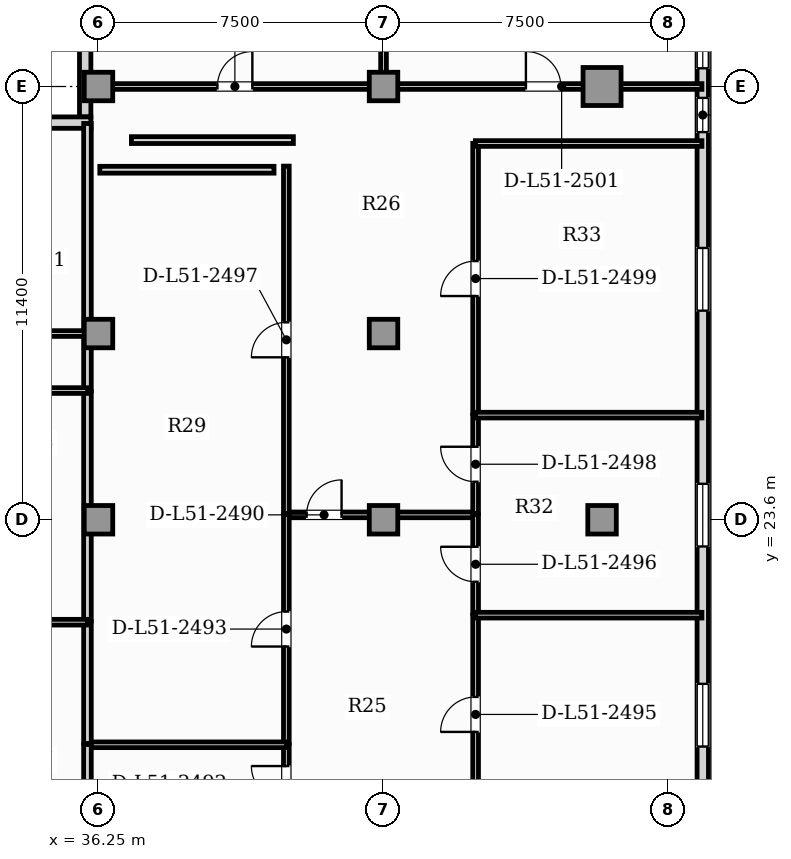
"""IFC4 building model, lengths in metres.
Left out: names, types, materials, properties, quantities, classifications, styles, units other than length and angle.
Written with IfcOpenShell. Run it as: python <this file> out.ifc"""

import sys

from ifc_helpers import new_model, si_unit, direction, frame, frame_2d, origin, origin_2d, place, context, subcontext, project, spatial, rectangle, hollow_rectangle, extrude, element, fill, save


model = new_model("IFC4")
c1 = context("Model", 3, precision=1e-05, world=origin(), true_north=direction((0.0, 1.0)))
c2 = subcontext(c1, "Body", "Model", "MODEL_VIEW")
j1 = project(units=[si_unit("LENGTHUNIT", "METRE"), si_unit("PLANEANGLEUNIT", "RADIAN")], contexts=[c1])
p1 = place(None, origin())
s1 = spatial("IfcSite", under=j1, at=p1, CompositionType="ELEMENT")
p2 = place(p1, origin())
s2 = spatial("IfcBuilding", under=s1, at=p2, CompositionType="ELEMENT")
p3 = place(p2, frame((0.0, 0.0, 208.0)))
s3 = spatial("IfcBuildingStorey", under=s2, at=p3, CompositionType="ELEMENT", Elevation=208.0)
p4 = place(p3, frame((49.5, 35.0, 0.0), z_axis=(0.0, 0.0, 1.0), x_axis=(1.0, 0.0, 0.0)))
e1 = element("IfcColumn", 1, at=p4, inside=s3, PredefinedType="USERDEFINED", context=c2, shape_type="SweptSolid", body=[
    extrude(hollow_rectangle(XDim=1.0, YDim=1.0, WallThickness=0.06, at=origin_2d()), origin(), (0.0, 0.0, 1.0), 3.85),
])
for number, where, z_axis, x_axis in (
    (2, (36.25, 23.6, 0.0), (0.0, 0.0, 1.0), (1.0, 0.0, 0.0)),
    (3, (43.75, 23.6, 0.0), (0.0, 0.0, 1.0), (1.0, 0.0, 0.0)),
    (4, (49.5, 23.6, 0.0), (0.0, 0.0, 1.0), (1.0, 0.0, 0.0)),
    (5, (36.25, 28.5, 0.0), (0.0, 0.0, 1.0), (1.0, 0.0, 0.0)),
    (6, (43.75, 28.5, 0.0), (0.0, 0.0, 1.0), (1.0, 0.0, 0.0)),
    (7, (36.25, 35.0, 0.0), (0.0, 0.0, 1.0), (1.0, 0.0, 0.0)),
    (8, (43.75, 35.0, 0.0), (0.0, 0.0, 1.0), (1.0, 0.0, 0.0)),
):
    element("IfcColumn", number, at=place(p3, frame(where, z_axis=z_axis, x_axis=x_axis)), inside=s3, PredefinedType="COLUMN", context=c2, shape_type="SweptSolid", body=[
        extrude(rectangle(XDim=0.75, YDim=0.75, at=origin_2d()), origin(), (0.0, 0.0, 1.0), 3.85),
    ])
p5 = place(p3, frame((52.15, 3.24, 0.0), z_axis=(0.0, 0.0, 1.0), x_axis=(0.0, 1.0, 0.0)))
e9 = element("IfcWall", 9, at=p5, inside=s3, PredefinedType="SOLIDWALL", context=c2, shape_type="SweptSolid", body=[
    extrude(rectangle(XDim=33.92, YDim=0.3, at=frame_2d((16.96, 0.0))), origin(), (0.0, 0.0, 1.0), 3.63),
])
p6 = place(p5, frame((30.56, 0.0, 0.95)))
e10 = element("IfcOpeningElement", 10, at=p6, cuts=e9, PredefinedType="OPENING", context=c2, shape_type="SweptSolid", body=[
    extrude(rectangle(XDim=0.9, YDim=1.5, at=frame_2d((0.45, 0.75))), frame((0.0, 0.16, 0.0), z_axis=(0.0, -1.0, 0.0), x_axis=(1.0, 0.0, 0.0)), (0.0, 0.0, 1.0), 0.32),
])
p7 = place(p5, frame((11.108, 0.0, 0.95)))
e11 = element("IfcOpeningElement", 11, at=p7, cuts=e9, PredefinedType="OPENING", context=c2, shape_type="SweptSolid", body=[
    extrude(rectangle(XDim=0.9, YDim=1.5, at=frame_2d((0.45, 0.75))), frame((0.0, 0.16, 0.0), z_axis=(0.0, -1.0, 0.0), x_axis=(1.0, 0.0, 0.0)), (0.0, 0.0, 1.0), 0.32),
])
p8 = place(p5, frame((14.393, 0.0, 0.88)))
e12 = element("IfcOpeningElement", 12, at=p8, cuts=e9, PredefinedType="OPENING", context=c2, shape_type="SweptSolid", body=[
    extrude(rectangle(XDim=1.65, YDim=2.0, at=frame_2d((0.825, 1.0))), frame((0.0, 0.16, 0.0), z_axis=(0.0, -1.0, 0.0), x_axis=(1.0, 0.0, 0.0)), (0.0, 0.0, 1.0), 0.32),
])
p9 = place(p5, frame((19.657, 0.0, 0.88)))
e13 = element("IfcOpeningElement", 13, at=p9, cuts=e9, PredefinedType="OPENING", context=c2, shape_type="SweptSolid", body=[
    extrude(rectangle(XDim=1.65, YDim=2.0, at=frame_2d((0.825, 1.0))), frame((0.0, 0.16, 0.0), z_axis=(0.0, -1.0, 0.0), x_axis=(1.0, 0.0, 0.0)), (0.0, 0.0, 1.0), 0.32),
])
p10 = place(p5, frame((25.862, 0.0, 0.88)))
e14 = element("IfcOpeningElement", 14, at=p10, cuts=e9, PredefinedType="OPENING", context=c2, shape_type="SweptSolid", body=[
    extrude(rectangle(XDim=1.65, YDim=2.0, at=frame_2d((0.825, 1.0))), frame((0.0, 0.16, 0.0), z_axis=(0.0, -1.0, 0.0), x_axis=(1.0, 0.0, 0.0)), (0.0, 0.0, 1.0), 0.32),
])
p11 = place(p5, frame((32.24, 0.0, 0.95)))
e15 = element("IfcOpeningElement", 15, at=p11, cuts=e9, PredefinedType="OPENING", context=c2, shape_type="SweptSolid", body=[
    extrude(rectangle(XDim=0.9, YDim=1.5, at=frame_2d((0.45, 0.75))), frame((0.0, 0.16, 0.0), z_axis=(0.0, -1.0, 0.0), x_axis=(1.0, 0.0, 0.0)), (0.0, 0.0, 1.0), 0.32),
])
p12 = place(p3, frame((35.9, 40.36, 0.0), z_axis=(0.0, 0.0, 1.0), x_axis=(0.0, -1.0, 0.0)))
e16 = element("IfcWall", 16, at=p12, inside=s3, PredefinedType="SOLIDWALL", context=c2, shape_type="SweptSolid", body=[
    extrude(rectangle(XDim=6.16, YDim=0.3, at=frame_2d((3.08, 0.0))), origin(), (0.0, 0.0, 1.0), 3.63),
])
p13 = place(p3, frame((34.25, 34.05, 0.0), z_axis=(0.0, 0.0, 1.0), x_axis=(1.0, 0.0, 0.0)))
e17 = element("IfcWall", 17, at=p13, inside=s3, PredefinedType="SOLIDWALL", context=c2, shape_type="SweptSolid", body=[
    extrude(rectangle(XDim=1.8, YDim=0.3, at=frame_2d((0.9, 0.0))), origin(), (0.0, 0.0, 1.0), 3.63),
])
p14 = place(p3, frame((41.188, 23.729, 0.0), z_axis=(0.0, 0.0, 1.0), x_axis=(1.0, 0.0, 0.0)))
e18 = element("IfcWall", 18, at=p14, inside=s3, PredefinedType="PARTITIONING", context=c2, shape_type="SweptSolid", body=[
    extrude(rectangle(XDim=4.99, YDim=0.15, at=frame_2d((2.495, 0.0))), origin(), (0.0, 0.0, 1.0), 3.085),
])
p15 = place(p14, frame((0.538, 0.0, 0.0)))
e19 = element("IfcOpeningElement", 19, at=p15, cuts=e18, PredefinedType="OPENING", context=c2, shape_type="SweptSolid", body=[
    extrude(rectangle(XDim=0.92, YDim=2.1, at=frame_2d((0.46, 1.05))), frame((0.0, 0.085, 0.0), z_axis=(0.0, -1.0, 0.0), x_axis=(1.0, 0.0, 0.0)), (0.0, 0.0, 1.0), 0.17),
])
p16 = place(p3, frame((41.193, 15.635, 0.0), z_axis=(0.0, 0.0, 1.0), x_axis=(0.0, 1.0, 0.0)))
e20 = element("IfcWall", 20, at=p16, inside=s3, PredefinedType="PARTITIONING", context=c2, shape_type="SweptSolid", body=[
    extrude(rectangle(XDim=2.05, YDim=0.15, at=frame_2d((1.025, 0.0))), origin(), (0.0, 0.0, 1.0), 3.63),
])
p17 = place(p16, frame((0.565, 0.0, 0.0)))
e21 = element("IfcOpeningElement", 21, at=p17, cuts=e20, PredefinedType="OPENING", context=c2, shape_type="SweptSolid", body=[
    extrude(rectangle(XDim=0.92, YDim=2.1, at=frame_2d((0.46, 1.05))), frame((0.0, 0.085, 0.0), z_axis=(0.0, -1.0, 0.0), x_axis=(1.0, 0.0, 0.0)), (0.0, 0.0, 1.0), 0.17),
])
p18 = place(p3, frame((41.193, 17.715, 0.0), z_axis=(0.0, 0.0, 1.0), x_axis=(0.0, 1.0, 0.0)))
e22 = element("IfcWall", 22, at=p18, inside=s3, PredefinedType="PARTITIONING", context=c2, shape_type="SweptSolid", body=[
    extrude(rectangle(XDim=6.019, YDim=0.15, at=frame_2d((3.01, 0.0))), origin(), (0.0, 0.0, 1.0), 3.63),
])
p19 = place(p18, frame((2.55, 0.0, 0.0)))
e23 = element("IfcOpeningElement", 23, at=p19, cuts=e22, PredefinedType="OPENING", context=c2, shape_type="SweptSolid", body=[
    extrude(rectangle(XDim=0.92, YDim=2.1, at=frame_2d((0.46, 1.05))), frame((0.0, 0.085, 0.0), z_axis=(0.0, -1.0, 0.0), x_axis=(1.0, 0.0, 0.0)), (0.0, 0.0, 1.0), 0.17),
])
p20 = place(p3, frame((46.173, 15.861, 0.0), z_axis=(0.0, 0.0, 1.0), x_axis=(0.0, 1.0, 0.0)))
e24 = element("IfcWall", 24, at=p20, inside=s3, PredefinedType="PARTITIONING", context=c2, shape_type="SweptSolid", body=[
    extrude(rectangle(XDim=5.234, YDim=0.15, at=frame_2d((2.617, 0.0))), origin(), (0.0, 0.0, 1.0), 3.63),
])
p21 = place(p20, frame((2.157, 0.0, 0.0)))
e25 = element("IfcOpeningElement", 25, at=p21, cuts=e24, PredefinedType="OPENING", context=c2, shape_type="SweptSolid", body=[
    extrude(rectangle(XDim=0.92, YDim=2.1, at=frame_2d((0.46, 1.05))), frame((0.0, 0.085, 0.0), z_axis=(0.0, -1.0, 0.0), x_axis=(1.0, 0.0, 0.0)), (0.0, 0.0, 1.0), 0.17),
])
p22 = place(p3, frame((46.173, 21.125, 0.0), z_axis=(0.0, 0.0, 1.0), x_axis=(0.0, 1.0, 0.0)))
e26 = element("IfcWall", 26, at=p22, inside=s3, PredefinedType="PARTITIONING", context=c2, shape_type="SweptSolid", body=[
    extrude(rectangle(XDim=2.609, YDim=0.15, at=frame_2d((1.305, 0.0))), origin(), (0.0, 0.0, 1.0), 3.63),
])
p23 = place(p22, frame((0.845, 0.0, 0.0)))
e27 = element("IfcOpeningElement", 27, at=p23, cuts=e26, PredefinedType="OPENING", context=c2, shape_type="SweptSolid", body=[
    extrude(rectangle(XDim=0.92, YDim=2.1, at=frame_2d((0.46, 1.05))), frame((0.0, 0.085, 0.0), z_axis=(0.0, -1.0, 0.0), x_axis=(1.0, 0.0, 0.0)), (0.0, 0.0, 1.0), 0.17),
])
p24 = place(p3, frame((41.193, 23.764, 0.0), z_axis=(0.0, 0.0, 1.0), x_axis=(0.0, 1.0, 0.0)))
e28 = element("IfcWall", 28, at=p24, inside=s3, PredefinedType="PARTITIONING", context=c2, shape_type="SweptSolid", body=[
    extrude(rectangle(XDim=9.141, YDim=0.15, at=frame_2d((4.57, 0.0))), origin(), (0.0, 0.0, 1.0), 3.63),
])
p25 = place(p24, frame((4.111, 0.0, 0.0)))
e29 = element("IfcOpeningElement", 29, at=p25, cuts=e28, PredefinedType="OPENING", context=c2, shape_type="SweptSolid", body=[
    extrude(rectangle(XDim=0.92, YDim=2.1, at=frame_2d((0.46, 1.05))), frame((0.0, 0.085, 0.0), z_axis=(0.0, -1.0, 0.0), x_axis=(1.0, 0.0, 0.0)), (0.0, 0.0, 1.0), 0.17),
])
p26 = place(p3, frame((46.173, 23.764, 0.0), z_axis=(0.0, 0.0, 1.0), x_axis=(0.0, 1.0, 0.0)))
e30 = element("IfcWall", 30, at=p26, inside=s3, PredefinedType="PARTITIONING", context=c2, shape_type="SweptSolid", body=[
    extrude(rectangle(XDim=2.594, YDim=0.15, at=frame_2d((1.297, 0.0))), origin(), (0.0, 0.0, 1.0), 3.63),
])
p27 = place(p26, frame((0.837, 0.0, 0.0)))
e31 = element("IfcOpeningElement", 31, at=p27, cuts=e30, PredefinedType="OPENING", context=c2, shape_type="SweptSolid", body=[
    extrude(rectangle(XDim=0.92, YDim=2.1, at=frame_2d((0.46, 1.05))), frame((0.0, 0.085, 0.0), z_axis=(0.0, -1.0, 0.0), x_axis=(1.0, 0.0, 0.0)), (0.0, 0.0, 1.0), 0.17),
])
p28 = place(p3, frame((46.173, 26.388, 0.0), z_axis=(0.0, 0.0, 1.0), x_axis=(0.0, 1.0, 0.0)))
e32 = element("IfcWall", 32, at=p28, inside=s3, PredefinedType="PARTITIONING", context=c2, shape_type="SweptSolid", body=[
    extrude(rectangle(XDim=7.116, YDim=0.15, at=frame_2d((3.558, 0.0))), origin(), (0.0, 0.0, 1.0), 3.63),
])
p29 = place(p28, frame((3.098, 0.0, 0.0)))
e33 = element("IfcOpeningElement", 33, at=p29, cuts=e32, PredefinedType="OPENING", context=c2, shape_type="SweptSolid", body=[
    extrude(rectangle(XDim=0.92, YDim=2.1, at=frame_2d((0.46, 1.05))), frame((0.0, 0.085, 0.0), z_axis=(0.0, -1.0, 0.0), x_axis=(1.0, 0.0, 0.0)), (0.0, 0.0, 1.0), 0.17),
])
p30 = place(p3, frame((46.168, 33.5, 0.0), z_axis=(0.0, 0.0, 1.0), x_axis=(1.0, 0.0, 0.0)))
e34 = element("IfcWall", 34, at=p30, inside=s3, PredefinedType="PARTITIONING", context=c2, shape_type="SweptSolid", body=[
    extrude(rectangle(XDim=5.959, YDim=0.15, at=frame_2d((2.979, 0.0))), origin(), (0.0, 0.0, 1.0), 3.63),
])
p31 = place(p3, frame((35.923, 35.0, 0.0), z_axis=(0.0, 0.0, 1.0), x_axis=(1.0, 0.0, 0.0)))
e35 = element("IfcWall", 35, at=p31, inside=s3, PredefinedType="PARTITIONING", context=c2, shape_type="SweptSolid", body=[
    extrude(rectangle(XDim=7.832, YDim=0.15, at=frame_2d((3.916, 0.0))), origin(), (0.0, 0.0, 1.0), 3.085),
])
p32 = place(p31, frame((3.456, 0.0, 0.0)))
e36 = element("IfcOpeningElement", 36, at=p32, cuts=e35, PredefinedType="OPENING", context=c2, shape_type="SweptSolid", body=[
    extrude(rectangle(XDim=0.92, YDim=2.1, at=frame_2d((0.46, 1.05))), frame((0.0, 0.085, 0.0), z_axis=(0.0, -1.0, 0.0), x_axis=(1.0, 0.0, 0.0)), (0.0, 0.0, 1.0), 0.17),
])
p33 = place(p3, frame((43.785, 35.0, 0.0), z_axis=(0.0, 0.0, 1.0), x_axis=(1.0, 0.0, 0.0)))
e37 = element("IfcWall", 37, at=p33, inside=s3, PredefinedType="PARTITIONING", context=c2, shape_type="SweptSolid", body=[
    extrude(rectangle(XDim=8.343, YDim=0.15, at=frame_2d((4.171, 0.0))), origin(), (0.0, 0.0, 1.0), 3.085),
])
p34 = place(p33, frame((3.711, 0.0, 0.0)))
e38 = element("IfcOpeningElement", 38, at=p34, cuts=e37, PredefinedType="OPENING", context=c2, shape_type="SweptSolid", body=[
    extrude(rectangle(XDim=0.92, YDim=2.1, at=frame_2d((0.46, 1.05))), frame((0.0, 0.085, 0.0), z_axis=(0.0, -1.0, 0.0), x_axis=(1.0, 0.0, 0.0)), (0.0, 0.0, 1.0), 0.17),
])
p35 = place(p3, frame((35.955, 17.68, 0.0), z_axis=(0.0, 0.0, 1.0), x_axis=(1.0, 0.0, 0.0)))
e39 = element("IfcWall", 39, at=p35, inside=s3, PredefinedType="PARTITIONING", context=c2, shape_type="SweptSolid", body=[
    extrude(rectangle(XDim=5.243, YDim=0.15, at=frame_2d((2.622, 0.0))), origin(), (0.0, 0.0, 1.0), 3.63),
])
p36 = place(p3, frame((35.96, 16.087, 0.0), z_axis=(0.0, 0.0, 1.0), x_axis=(0.0, 1.0, 0.0)))
e40 = element("IfcWall", 40, at=p36, inside=s3, PredefinedType="PARTITIONING", context=c2, shape_type="SweptSolid", body=[
    extrude(rectangle(XDim=1.597, YDim=0.2, at=frame_2d((0.799, 0.0))), origin(), (0.0, 0.0, 1.0), 3.63),
])
p37 = place(p3, frame((35.96, 26.995, 0.0), z_axis=(0.0, 0.0, 1.0), x_axis=(0.0, 1.0, 0.0)))
e41 = element("IfcWall", 41, at=p37, inside=s3, PredefinedType="PARTITIONING", context=c2, shape_type="SweptSolid", body=[
    extrude(rectangle(XDim=1.51, YDim=0.2, at=frame_2d((0.755, 0.0))), origin(), (0.0, 0.0, 1.0), 3.63),
])
p38 = place(p3, frame((35.96, 17.715, 0.0), z_axis=(0.0, 0.0, 1.0), x_axis=(0.0, 1.0, 0.0)))
e42 = element("IfcWall", 42, at=p38, inside=s3, PredefinedType="PARTITIONING", context=c2, shape_type="SweptSolid", body=[
    extrude(rectangle(XDim=3.195, YDim=0.2, at=frame_2d((1.598, 0.0))), origin(), (0.0, 0.0, 1.0), 3.63),
])
p39 = place(p3, frame((35.96, 20.94, 0.0), z_axis=(0.0, 0.0, 1.0), x_axis=(0.0, 1.0, 0.0)))
e43 = element("IfcWall", 43, at=p39, inside=s3, PredefinedType="PARTITIONING", context=c2, shape_type="SweptSolid", body=[
    extrude(rectangle(XDim=6.025, YDim=0.2, at=frame_2d((3.013, 0.0))), origin(), (0.0, 0.0, 1.0), 3.63),
])
p40 = place(p3, frame((35.96, 28.535, 0.0), z_axis=(0.0, 0.0, 1.0), x_axis=(0.0, 1.0, 0.0)))
e44 = element("IfcWall", 44, at=p40, inside=s3, PredefinedType="PARTITIONING", context=c2, shape_type="SweptSolid", body=[
    extrude(rectangle(XDim=5.493, YDim=0.2, at=frame_2d((2.746, 0.0))), origin(), (0.0, 0.0, 1.0), 3.63),
])
for number, where, z_axis, x_axis in (
    (45, (46.168, 21.09, 0.0), (0.0, 0.0, 1.0), (1.0, 0.0, 0.0)),
    (46, (46.168, 26.354, 0.0), (0.0, 0.0, 1.0), (1.0, 0.0, 0.0)),
):
    element("IfcWall", number, at=place(p3, frame(where, z_axis=z_axis, x_axis=x_axis)), inside=s3, PredefinedType="PARTITIONING", context=c2, shape_type="SweptSolid", body=[
        extrude(rectangle(XDim=5.959, YDim=0.15, at=frame_2d((2.979, 0.0))), origin(), (0.0, 0.0, 1.0), 3.63),
    ])
p41 = place(p3, frame((43.75, 34.995, 0.0), z_axis=(0.0, 0.0, 1.0), x_axis=(0.0, 1.0, 0.0)))
e47 = element("IfcWall", 47, at=p41, inside=s3, PredefinedType="PARTITIONING", context=c2, shape_type="SweptSolid", body=[
    extrude(rectangle(XDim=5.232, YDim=0.15, at=frame_2d((2.616, 0.0))), origin(), (0.0, 0.0, 1.0), 3.63),
])
p42 = place(p3, frame((31.294, 27.0, 0.0), z_axis=(0.0, 0.0, 1.0), x_axis=(1.0, 0.0, 0.0)))
e48 = element("IfcWall", 48, at=p42, inside=s3, PredefinedType="PARTITIONING", context=c2, shape_type="SweptSolid", body=[
    extrude(rectangle(XDim=4.671, YDim=0.15, at=frame_2d((2.335, 0.0))), origin(), (0.0, 0.0, 1.0), 3.63),
])
p43 = place(p3, frame((31.767, 28.5, 0.0), z_axis=(0.0, 0.0, 1.0), x_axis=(1.0, 0.0, 0.0)))
e49 = element("IfcWall", 49, at=p43, inside=s3, PredefinedType="PARTITIONING", context=c2, shape_type="SweptSolid", body=[
    extrude(rectangle(XDim=4.198, YDim=0.15, at=frame_2d((2.099, 0.0))), origin(), (0.0, 0.0, 1.0), 3.63),
])
p44 = place(p43, frame((1.639, 0.0, 0.0)))
e50 = element("IfcOpeningElement", 50, at=p44, cuts=e49, PredefinedType="OPENING", context=c2, shape_type="SweptSolid", body=[
    extrude(rectangle(XDim=0.92, YDim=2.1, at=frame_2d((0.46, 1.05))), frame((0.0, 0.085, 0.0), z_axis=(0.0, -1.0, 0.0), x_axis=(1.0, 0.0, 0.0)), (0.0, 0.0, 1.0), 0.17),
])
p45 = place(p3, frame((31.294, 20.905, 0.0), z_axis=(0.0, 0.0, 1.0), x_axis=(1.0, 0.0, 0.0)))
e51 = element("IfcWall", 51, at=p45, inside=s3, PredefinedType="PARTITIONING", context=c2, shape_type="SweptSolid", body=[
    extrude(rectangle(XDim=4.671, YDim=0.15, at=frame_2d((2.335, 0.0))), origin(), (0.0, 0.0, 1.0), 3.63),
])
p46 = place(p3, frame((41.378, 33.59, 0.0), z_axis=(0.0, 0.0, 1.0), x_axis=(-1.0, 0.0, 0.0)))
e52 = element("IfcWall", 52, at=p46, inside=s3, PredefinedType="PARTITIONING", context=c2, shape_type="SweptSolid", body=[
    extrude(rectangle(XDim=4.262, YDim=0.18, at=frame_2d((2.131, 0.0))), origin(), (0.0, 0.0, 1.0), 3.63),
])
p47 = place(p3, frame((36.285, 32.81, 0.0), z_axis=(0.0, 0.0, 1.0), x_axis=(1.0, 0.0, 0.0)))
e53 = element("IfcWall", 53, at=p47, inside=s3, PredefinedType="PARTITIONING", context=c2, shape_type="SweptSolid", body=[
    extrude(rectangle(XDim=4.583, YDim=0.18, at=frame_2d((2.292, 0.0))), origin(), (0.0, 0.0, 1.0), 3.63),
])
p48 = place(p6, origin())
e54 = element("IfcWindow", 54, at=p48, inside=s3, PartitioningType="SINGLE_PANEL", PredefinedType="WINDOW", context=c2, shape_type="SweptSolid", body=[
    extrude(rectangle(XDim=0.9, YDim=1.5, at=frame_2d((0.45, 0.75))), frame((0.0, 0.03, 0.0), z_axis=(0.0, -1.0, 0.0), x_axis=(1.0, 0.0, 0.0)), (0.0, 0.0, 1.0), 0.06),
])
fill(e10, e54)
p49 = place(p8, origin())
e55 = element("IfcWindow", 55, at=p49, inside=s3, PartitioningType="SINGLE_PANEL", PredefinedType="WINDOW", context=c2, shape_type="SweptSolid", body=[
    extrude(rectangle(XDim=1.65, YDim=2.0, at=frame_2d((0.825, 1.0))), frame((0.0, 0.03, 0.0), z_axis=(0.0, -1.0, 0.0), x_axis=(1.0, 0.0, 0.0)), (0.0, 0.0, 1.0), 0.06),
])
fill(e12, e55)
p50 = place(p9, origin())
e56 = element("IfcWindow", 56, at=p50, inside=s3, PartitioningType="SINGLE_PANEL", PredefinedType="WINDOW", context=c2, shape_type="SweptSolid", body=[
    extrude(rectangle(XDim=1.65, YDim=2.0, at=frame_2d((0.825, 1.0))), frame((0.0, 0.03, 0.0), z_axis=(0.0, -1.0, 0.0), x_axis=(1.0, 0.0, 0.0)), (0.0, 0.0, 1.0), 0.06),
])
fill(e13, e56)
p51 = place(p10, origin())
e57 = element("IfcWindow", 57, at=p51, inside=s3, PartitioningType="SINGLE_PANEL", PredefinedType="WINDOW", context=c2, shape_type="SweptSolid", body=[
    extrude(rectangle(XDim=1.65, YDim=2.0, at=frame_2d((0.825, 1.0))), frame((0.0, 0.03, 0.0), z_axis=(0.0, -1.0, 0.0), x_axis=(1.0, 0.0, 0.0)), (0.0, 0.0, 1.0), 0.06),
])
fill(e14, e57)
p52 = place(p11, origin())
e58 = element("IfcWindow", 58, at=p52, inside=s3, PartitioningType="SINGLE_PANEL", PredefinedType="WINDOW", context=c2, shape_type="SweptSolid", body=[
    extrude(rectangle(XDim=0.9, YDim=1.5, at=frame_2d((0.45, 0.75))), frame((0.0, 0.03, 0.0), z_axis=(0.0, -1.0, 0.0), x_axis=(1.0, 0.0, 0.0)), (0.0, 0.0, 1.0), 0.06),
])
fill(e15, e58)
p53 = place(p15, origin())
e59 = element("IfcDoor", 59, at=p53, inside=s3, OperationType="SINGLE_SWING_RIGHT", PredefinedType="DOOR", context=c2, shape_type="SweptSolid", body=[
    extrude(rectangle(XDim=0.92, YDim=2.1, at=frame_2d((0.46, 1.05))), frame((0.0, 0.025, 0.0), z_axis=(0.0, -1.0, 0.0), x_axis=(1.0, 0.0, 0.0)), (0.0, 0.0, 1.0), 0.05),
])
fill(e19, e59)
p54 = place(p17, origin())
e60 = element("IfcDoor", 60, at=p54, inside=s3, OperationType="SINGLE_SWING_RIGHT", PredefinedType="DOOR", context=c2, shape_type="SweptSolid", body=[
    extrude(rectangle(XDim=0.92, YDim=2.1, at=frame_2d((0.46, 1.05))), frame((0.0, 0.025, 0.0), z_axis=(0.0, -1.0, 0.0), x_axis=(1.0, 0.0, 0.0)), (0.0, 0.0, 1.0), 0.05),
])
fill(e21, e60)
p55 = place(p19, origin())
e61 = element("IfcDoor", 61, at=p55, inside=s3, OperationType="SINGLE_SWING_LEFT", PredefinedType="DOOR", context=c2, shape_type="SweptSolid", body=[
    extrude(rectangle(XDim=0.92, YDim=2.1, at=frame_2d((0.46, 1.05))), frame((0.0, 0.025, 0.0), z_axis=(0.0, -1.0, 0.0), x_axis=(1.0, 0.0, 0.0)), (0.0, 0.0, 1.0), 0.05),
])
fill(e23, e61)
p56 = place(p21, origin())
e62 = element("IfcDoor", 62, at=p56, inside=s3, OperationType="SINGLE_SWING_LEFT", PredefinedType="DOOR", context=c2, shape_type="SweptSolid", body=[
    extrude(rectangle(XDim=0.92, YDim=2.1, at=frame_2d((0.46, 1.05))), frame((0.0, 0.025, 0.0), z_axis=(0.0, -1.0, 0.0), x_axis=(1.0, 0.0, 0.0)), (0.0, 0.0, 1.0), 0.05),
])
fill(e25, e62)
p57 = place(p23, origin())
e63 = element("IfcDoor", 63, at=p57, inside=s3, OperationType="SINGLE_SWING_RIGHT", PredefinedType="DOOR", context=c2, shape_type="SweptSolid", body=[
    extrude(rectangle(XDim=0.92, YDim=2.1, at=frame_2d((0.46, 1.05))), frame((0.0, 0.025, 0.0), z_axis=(0.0, -1.0, 0.0), x_axis=(1.0, 0.0, 0.0)), (0.0, 0.0, 1.0), 0.05),
])
fill(e27, e63)
p58 = place(p25, origin())
e64 = element("IfcDoor", 64, at=p58, inside=s3, OperationType="SINGLE_SWING_LEFT", PredefinedType="DOOR", context=c2, shape_type="SweptSolid", body=[
    extrude(rectangle(XDim=0.92, YDim=2.1, at=frame_2d((0.46, 1.05))), frame((0.0, 0.025, 0.0), z_axis=(0.0, -1.0, 0.0), x_axis=(1.0, 0.0, 0.0)), (0.0, 0.0, 1.0), 0.05),
])
fill(e29, e64)
p59 = place(p27, origin())
e65 = element("IfcDoor", 65, at=p59, inside=s3, OperationType="SINGLE_SWING_RIGHT", PredefinedType="DOOR", context=c2, shape_type="SweptSolid", body=[
    extrude(rectangle(XDim=0.92, YDim=2.1, at=frame_2d((0.46, 1.05))), frame((0.0, 0.025, 0.0), z_axis=(0.0, -1.0, 0.0), x_axis=(1.0, 0.0, 0.0)), (0.0, 0.0, 1.0), 0.05),
])
fill(e31, e65)
p60 = place(p29, origin())
e66 = element("IfcDoor", 66, at=p60, inside=s3, OperationType="SINGLE_SWING_LEFT", PredefinedType="DOOR", context=c2, shape_type="SweptSolid", body=[
    extrude(rectangle(XDim=0.92, YDim=2.1, at=frame_2d((0.46, 1.05))), frame((0.0, 0.025, 0.0), z_axis=(0.0, -1.0, 0.0), x_axis=(1.0, 0.0, 0.0)), (0.0, 0.0, 1.0), 0.05),
])
fill(e33, e66)
p61 = place(p32, origin())
e67 = element("IfcDoor", 67, at=p61, inside=s3, OperationType="SINGLE_SWING_RIGHT", PredefinedType="DOOR", context=c2, shape_type="SweptSolid", body=[
    extrude(rectangle(XDim=0.92, YDim=2.1, at=frame_2d((0.46, 1.05))), frame((0.0, 0.025, 0.0), z_axis=(0.0, -1.0, 0.0), x_axis=(1.0, 0.0, 0.0)), (0.0, 0.0, 1.0), 0.05),
])
fill(e36, e67)
p62 = place(p34, origin())
e68 = element("IfcDoor", 68, at=p62, inside=s3, OperationType="SINGLE_SWING_LEFT", PredefinedType="DOOR", context=c2, shape_type="SweptSolid", body=[
    extrude(rectangle(XDim=0.92, YDim=2.1, at=frame_2d((0.46, 1.05))), frame((0.0, 0.025, 0.0), z_axis=(0.0, -1.0, 0.0), x_axis=(1.0, 0.0, 0.0)), (0.0, 0.0, 1.0), 0.05),
])
fill(e38, e68)
save(model, sys.argv[1])
